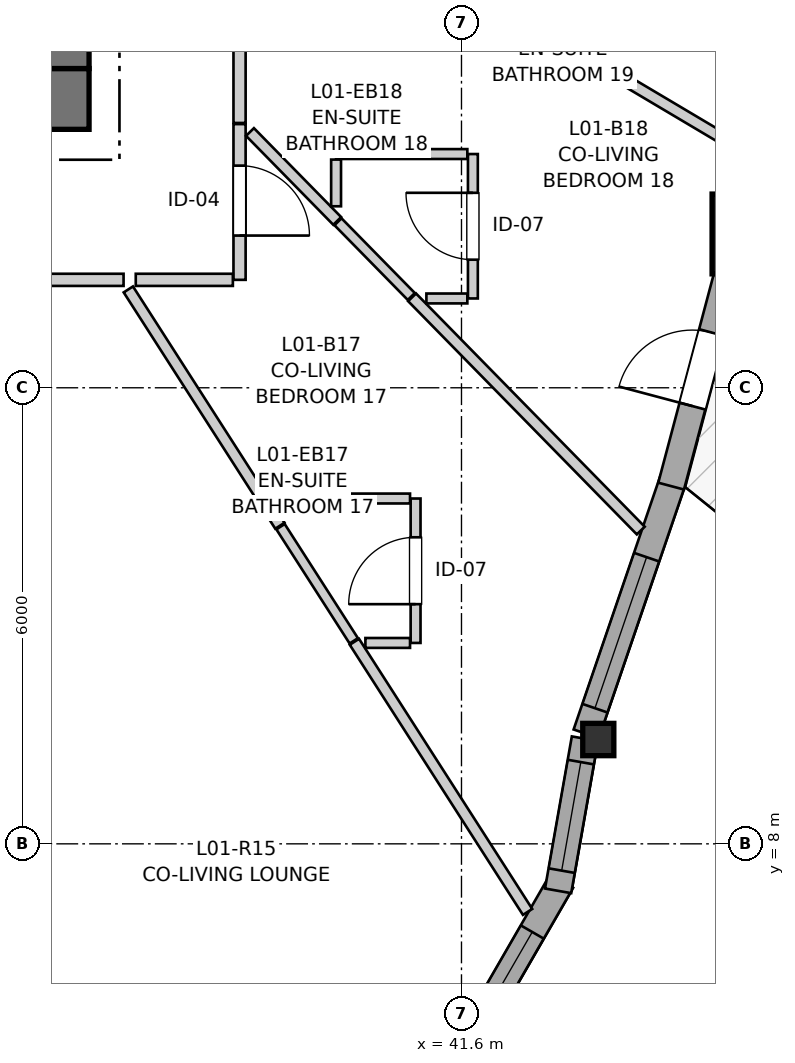
"""IFC4 building model, lengths in metres.
Left out: names, types, materials, properties, quantities, classifications, styles, units other than length and angle.
Written with IfcOpenShell. Run it as: python <this file> out.ifc"""

import sys

from ifc_helpers import new_model, si_unit, direction, frame, frame_2d, origin, origin_2d, place, context, subcontext, project, spatial, rectangle, i_section, extrude, source, transform, mapped, element, fill, save


model = new_model("IFC4")
c1 = context("Model", 3, precision=1e-05, world=origin(), true_north=direction((0.0, 1.0)))
c2 = subcontext(c1, "Body", "Model", "MODEL_VIEW")
j1 = project(units=[si_unit("LENGTHUNIT", "METRE"), si_unit("PLANEANGLEUNIT", "RADIAN")], contexts=[c1])
p1 = place(None, origin())
s1 = spatial("IfcSite", under=j1, at=p1, CompositionType="ELEMENT")
p2 = place(p1, origin())
s2 = spatial("IfcBuilding", under=s1, at=p2, CompositionType="ELEMENT")
p3 = place(p2, frame((0.0, 0.0, 7.8)))
s3 = spatial("IfcBuildingStorey", under=s2, at=p3, CompositionType="ELEMENT", Elevation=7.8)
p4 = place(p3, frame((24.0, 17.8, 0.0), z_axis=(0.0, 0.0, 1.0), x_axis=(1.0, 0.0, 0.0)))
e1 = element("IfcWall", 1, at=p4, inside=s3, PredefinedType="SHEAR", context=c2, shape_type="SweptSolid", body=[
    extrude(rectangle(XDim=12.7, YDim=0.8, at=frame_2d((6.35, 0.0))), origin(), (0.0, 0.0, 1.0), 2.94),
])
p5 = place(p3, frame((36.3, 18.2, 0.0), z_axis=(0.0, 0.0, 1.0), x_axis=(0.0, 1.0, 0.0)))
e2 = element("IfcWall", 2, at=p5, inside=s3, PredefinedType="SHEAR", context=c2, shape_type="SweptSolid", body=[
    extrude(rectangle(XDim=15.6, YDim=0.8, at=frame_2d((7.8, 0.0))), origin(), (0.0, 0.0, 1.0), 2.94),
])
p6 = place(p5, frame((4.25, 0.0, 0.0)))
e3 = element("IfcOpeningElement", 3, at=p6, cuts=e2, PredefinedType="OPENING", context=c2, shape_type="SweptSolid", body=[
    extrude(rectangle(XDim=1.1, YDim=2.15, at=frame_2d((0.55, 1.075))), frame((0.0, 0.41, 0.0), z_axis=(0.0, -1.0, 0.0), x_axis=(1.0, 0.0, 0.0)), (0.0, 0.0, 1.0), 0.82),
])
p7 = place(p5, frame((10.25, 0.0, 0.0)))
e4 = element("IfcOpeningElement", 4, at=p7, cuts=e2, PredefinedType="OPENING", context=c2, shape_type="SweptSolid", body=[
    extrude(rectangle(XDim=1.1, YDim=2.15, at=frame_2d((0.55, 1.075))), frame((0.0, 0.41, 0.0), z_axis=(0.0, -1.0, 0.0), x_axis=(1.0, 0.0, 0.0)), (0.0, 0.0, 1.0), 0.82),
])
m1 = source(origin(), c2, "Body", "SweptSolid", [
    extrude(i_section(OverallWidth=0.409, OverallDepth=0.425, WebThickness=0.03, FlangeThickness=0.048, FilletRadius=0.015, at=origin_2d()), origin(), (0.0, 0.0, 1.0), 2.94),
])
p8 = place(p3, frame((43.4, 9.372, 0.0), z_axis=(0.0, 0.0, 1.0), x_axis=(1.0, 0.0, 0.0)))
e5 = element("IfcColumn", 5, at=p8, inside=s3, PredefinedType="PILASTER", context=c2, shape_type="MappedRepresentation", body=[
    mapped(m1, transform((0.0, 0.0, 0.0), x_axis=(1.0, 0.0, 0.0), y_axis=(0.0, 1.0, 0.0), z_axis=(0.0, 0.0, 1.0), scale=1.0)),
])
m2 = source(origin(), c2, "Body", "SweptSolid", [
    extrude(rectangle(XDim=1.05, YDim=1.05, at=origin_2d()), origin(), (0.0, 0.0, 1.0), 2.94),
])
p9 = place(p3, frame((45.422, 16.023, 0.0), z_axis=(0.0, 0.0, 1.0), x_axis=(1.0, 0.0, 0.0)))
e6 = element("IfcColumn", 6, at=p9, inside=s3, PredefinedType="COLUMN", context=c2, shape_type="MappedRepresentation", body=[
    mapped(m2, transform((0.0, 0.0, 0.0), x_axis=(1.0, 0.0, 0.0), y_axis=(0.0, 1.0, 0.0), z_axis=(0.0, 0.0, 1.0), scale=1.0)),
])
p10 = place(p3, frame((41.873, 5.699, 0.0), z_axis=(0.0, 0.0, 1.0), x_axis=(0.49990781971, 0.866078617559, 0.0)))
e7 = element("IfcWall", 7, at=p10, inside=s3, PredefinedType="SOLIDWALL", context=c2, shape_type="SweptSolid", body=[
    extrude(rectangle(XDim=2.09, YDim=0.35, at=frame_2d((1.045, 0.0))), origin(), (0.0, 0.0, 1.0), 2.42),
])
p11 = place(p10, frame((0.268, 0.0, 0.82)))
e8 = element("IfcOpeningElement", 8, at=p11, cuts=e7, PredefinedType="OPENING", context=c2, shape_type="SweptSolid", body=[
    extrude(rectangle(XDim=1.05, YDim=1.45, at=frame_2d((0.525, 0.725))), frame((0.0, 0.185, 0.0), z_axis=(0.0, -1.0, 0.0), x_axis=(1.0, 0.0, 0.0)), (0.0, 0.0, 1.0), 0.37),
])
p12 = place(p3, frame((42.871, 7.382, 0.0), z_axis=(0.0, 0.0, 1.0), x_axis=(0.173586593252, 0.984818610021, 0.0)))
e9 = element("IfcWall", 9, at=p12, inside=s3, PredefinedType="SOLIDWALL", context=c2, shape_type="SweptSolid", body=[
    extrude(rectangle(XDim=2.032, YDim=0.35, at=frame_2d((1.016, 0.0))), origin(), (0.0, 0.0, 1.0), 2.42),
])
p13 = place(p12, frame((0.27, 0.0, 0.82)))
e10 = element("IfcOpeningElement", 10, at=p13, cuts=e9, PredefinedType="OPENING", context=c2, shape_type="SweptSolid", body=[
    extrude(rectangle(XDim=1.45, YDim=1.25, at=frame_2d((0.725, 0.625))), frame((0.0, 0.185, 0.0), z_axis=(0.0, -1.0, 0.0), x_axis=(1.0, 0.0, 0.0)), (0.0, 0.0, 1.0), 0.37),
])
p14 = place(p3, frame((43.241, 9.448, 0.0), z_axis=(0.0, 0.0, 1.0), x_axis=(0.323599751171, 0.946194060984, 0.0)))
e11 = element("IfcWall", 11, at=p14, inside=s3, PredefinedType="SOLIDWALL", context=c2, shape_type="SweptSolid", body=[
    extrude(rectangle(XDim=3.532, YDim=0.35, at=frame_2d((1.766, 0.0))), origin(), (0.0, 0.0, 1.0), 2.42),
])
p15 = place(p14, frame((0.356, 0.0, 0.82)))
e12 = element("IfcOpeningElement", 12, at=p15, cuts=e11, PredefinedType="OPENING", context=c2, shape_type="SweptSolid", body=[
    extrude(rectangle(XDim=2.1, YDim=1.4, at=frame_2d((1.05, 0.7))), frame((0.0, 0.185, 0.0), z_axis=(0.0, -1.0, 0.0), x_axis=(1.0, 0.0, 0.0)), (0.0, 0.0, 1.0), 0.37),
])
p16 = place(p3, frame((44.358, 12.706, 0.0), z_axis=(0.0, 0.0, 1.0), x_axis=(0.25708907847, 0.966387709841, 0.0)))
e13 = element("IfcWall", 13, at=p16, inside=s3, PredefinedType="SOLIDWALL", context=c2, shape_type="SweptSolid", body=[
    extrude(rectangle(XDim=3.179, YDim=0.35, at=frame_2d((1.59, 0.0))), origin(), (0.0, 0.0, 1.0), 2.42),
])
p17 = place(p16, frame((1.09, 0.0, 0.0)))
e14 = element("IfcOpeningElement", 14, at=p17, cuts=e13, PredefinedType="OPENING", context=c2, shape_type="SweptSolid", body=[
    extrude(rectangle(XDim=1.0, YDim=2.1, at=frame_2d((0.5, 1.05))), frame((0.0, 0.185, 0.0), z_axis=(0.0, -1.0, 0.0), x_axis=(1.0, 0.0, 0.0)), (0.0, 0.0, 1.0), 0.37),
])
p18 = place(p3, frame((37.154, 15.42, 0.0), z_axis=(0.0, 0.0, 1.0), x_axis=(-1.0, 0.0, 0.0)))
e15 = element("IfcWall", 15, at=p18, inside=s3, PredefinedType="PARTITIONING", context=c2, shape_type="SweptSolid", body=[
    extrude(rectangle(XDim=3.774, YDim=0.16, at=frame_2d((1.887, 0.0))), origin(), (0.0, 0.0, 1.0), 2.94),
])
p19 = place(p18, frame((1.239, 0.0, 0.0)))
e16 = element("IfcOpeningElement", 16, at=p19, cuts=e15, PredefinedType="OPENING", context=c2, shape_type="SweptSolid", body=[
    extrude(rectangle(XDim=1.3, YDim=2.1, at=frame_2d((0.65, 1.05))), frame((0.0, 0.09, 0.0), z_axis=(0.0, -1.0, 0.0), x_axis=(1.0, 0.0, 0.0)), (0.0, 0.0, 1.0), 0.18),
])
p20 = place(p3, frame((38.68, 21.073, 0.0), z_axis=(0.0, 0.0, 1.0), x_axis=(0.0, -1.0, 0.0)))
e17 = element("IfcWall", 17, at=p20, inside=s3, PredefinedType="PARTITIONING", context=c2, shape_type="SweptSolid", body=[
    extrude(rectangle(XDim=3.589, YDim=0.16, at=frame_2d((1.794, 0.0))), origin(), (0.0, 0.0, 1.0), 2.94),
])
p21 = place(p20, frame((1.333, 0.0, 0.0)))
e18 = element("IfcOpeningElement", 18, at=p21, cuts=e17, PredefinedType="OPENING", context=c2, shape_type="SweptSolid", body=[
    extrude(rectangle(XDim=0.92, YDim=2.1, at=frame_2d((0.46, 1.05))), frame((0.0, 0.09, 0.0), z_axis=(0.0, -1.0, 0.0), x_axis=(1.0, 0.0, 0.0)), (0.0, 0.0, 1.0), 0.18),
])
p22 = place(p3, frame((38.68, 17.469, 0.0), z_axis=(0.0, 0.0, 1.0), x_axis=(0.0, -1.0, 0.0)))
e19 = element("IfcWall", 19, at=p22, inside=s3, PredefinedType="PARTITIONING", context=c2, shape_type="SweptSolid", body=[
    extrude(rectangle(XDim=2.049, YDim=0.16, at=frame_2d((1.024, 0.0))), origin(), (0.0, 0.0, 1.0), 2.94),
])
p23 = place(p22, frame((0.546, 0.0, 0.0)))
e20 = element("IfcOpeningElement", 20, at=p23, cuts=e19, PredefinedType="OPENING", context=c2, shape_type="SweptSolid", body=[
    extrude(rectangle(XDim=0.92, YDim=2.1, at=frame_2d((0.46, 1.05))), frame((0.0, 0.09, 0.0), z_axis=(0.0, -1.0, 0.0), x_axis=(1.0, 0.0, 0.0)), (0.0, 0.0, 1.0), 0.18),
])
p24 = place(p3, frame((40.996, 10.643, 0.0), z_axis=(0.0, 0.0, 1.0), x_axis=(0.0, 1.0, 0.0)))
e21 = element("IfcWall", 21, at=p24, inside=s3, PredefinedType="PARTITIONING", context=c2, shape_type="SweptSolid", body=[
    extrude(rectangle(XDim=1.9, YDim=0.13, at=frame_2d((0.95, 0.0))), origin(), (0.0, 0.0, 1.0), 2.94),
])
p25 = place(p24, frame((0.51, 0.0, 0.0)))
e22 = element("IfcOpeningElement", 22, at=p25, cuts=e21, PredefinedType="OPENING", context=c2, shape_type="SweptSolid", body=[
    extrude(rectangle(XDim=0.88, YDim=2.05, at=frame_2d((0.44, 1.025))), frame((0.0, 0.075, 0.0), z_axis=(0.0, -1.0, 0.0), x_axis=(1.0, 0.0, 0.0)), (0.0, 0.0, 1.0), 0.15),
])
p26 = place(p3, frame((41.75, 15.175, 0.0), z_axis=(0.0, 0.0, 1.0), x_axis=(0.0, 1.0, 0.0)))
e23 = element("IfcWall", 23, at=p26, inside=s3, PredefinedType="PARTITIONING", context=c2, shape_type="SweptSolid", body=[
    extrude(rectangle(XDim=1.9, YDim=0.13, at=frame_2d((0.95, 0.0))), origin(), (0.0, 0.0, 1.0), 2.94),
])
p27 = place(p26, frame((0.51, 0.0, 0.0)))
e24 = element("IfcOpeningElement", 24, at=p27, cuts=e23, PredefinedType="OPENING", context=c2, shape_type="SweptSolid", body=[
    extrude(rectangle(XDim=0.88, YDim=2.05, at=frame_2d((0.44, 1.025))), frame((0.0, 0.075, 0.0), z_axis=(0.0, -1.0, 0.0), x_axis=(1.0, 0.0, 0.0)), (0.0, 0.0, 1.0), 0.15),
])
p28 = place(p3, frame((33.426, 15.312, 0.0), z_axis=(0.0, 0.0, 1.0), x_axis=(0.276606114731, -0.960983380342, 0.0)))
e25 = element("IfcWall", 25, at=p28, inside=s3, PredefinedType="PARTITIONING", context=c2, shape_type="SweptSolid", body=[
    extrude(rectangle(XDim=11.749, YDim=0.145, at=frame_2d((5.875, 0.0))), origin(), (0.0, 0.0, 1.0), 2.94),
])
p29 = place(p3, frame((40.95, 15.19, 0.0), z_axis=(0.0, 0.0, 1.0), x_axis=(0.700142401903, -0.714003233226, 0.0)))
e26 = element("IfcWall", 26, at=p29, inside=s3, PredefinedType="PARTITIONING", context=c2, shape_type="SweptSolid", body=[
    extrude(rectangle(XDim=4.298, YDim=0.145, at=frame_2d((2.149, 0.0))), origin(), (0.0, 0.0, 1.0), 2.94),
])
p30 = place(p3, frame((40.191, 10.658, 0.0), z_axis=(0.0, 0.0, 1.0), x_axis=(0.539757550566, -0.841820519236, 0.0)))
e27 = element("IfcWall", 27, at=p30, inside=s3, PredefinedType="PARTITIONING", context=c2, shape_type="SweptSolid", body=[
    extrude(rectangle(XDim=4.221, YDim=0.145, at=frame_2d((2.111, 0.0))), origin(), (0.0, 0.0, 1.0), 2.94),
])
p31 = place(p3, frame((37.217, 15.294, 0.0), z_axis=(0.0, 0.0, 1.0), x_axis=(0.539878709929, -0.841742822105, 0.0)))
e28 = element("IfcWall", 28, at=p31, inside=s3, PredefinedType="PARTITIONING", context=c2, shape_type="SweptSolid", body=[
    extrude(rectangle(XDim=3.694, YDim=0.145, at=frame_2d((1.847, 0.0))), origin(), (0.0, 0.0, 1.0), 2.94),
])
p32 = place(p3, frame((42.848, 18.581, 0.0), z_axis=(0.0, 0.0, 1.0), x_axis=(0.859872599939, -0.510508679528, 0.0)))
e29 = element("IfcWall", 29, at=p32, inside=s3, PredefinedType="PARTITIONING", context=c2, shape_type="SweptSolid", body=[
    extrude(rectangle(XDim=2.813, YDim=0.145, at=frame_2d((1.407, 0.0))), origin(), (0.0, 0.0, 1.0), 2.94),
])
p33 = place(p3, frame((38.817, 17.365, 0.0), z_axis=(0.0, 0.0, 1.0), x_axis=(0.70029627305, -0.713852316626, 0.0)))
e30 = element("IfcWall", 30, at=p33, inside=s3, PredefinedType="PARTITIONING", context=c2, shape_type="SweptSolid", body=[
    extrude(rectangle(XDim=1.639, YDim=0.145, at=frame_2d((0.819, 0.0))), origin(), (0.0, 0.0, 1.0), 2.94),
])
for number, where, z_axis, x_axis in (
    (31, (39.196, 12.543, 0.0), (0.0, 0.0, 1.0), (1.0, 0.0, 0.0)),
    (32, (39.95, 17.075, 0.0), (0.0, 0.0, 1.0), (1.0, 0.0, 0.0)),
):
    element("IfcWall", number, at=place(p3, frame(where, z_axis=z_axis, x_axis=x_axis)), inside=s3, PredefinedType="PARTITIONING", context=c2, shape_type="SweptSolid", body=[
        extrude(rectangle(XDim=1.727, YDim=0.13, at=frame_2d((0.864, 0.0))), origin(), (0.0, 0.0, 1.0), 2.94),
    ])
p34 = place(p3, frame((39.219, 12.172, 0.0), z_axis=(0.0, 0.0, 1.0), x_axis=(0.539899826285, -0.84172927808, 0.0)))
e33 = element("IfcWall", 33, at=p34, inside=s3, PredefinedType="PARTITIONING", context=c2, shape_type="SweptSolid", body=[
    extrude(rectangle(XDim=1.784, YDim=0.13, at=frame_2d((0.892, 0.0))), origin(), (0.0, 0.0, 1.0), 2.94),
])
p35 = place(p3, frame((37.314, 15.42, 0.0), z_axis=(0.0, 0.0, 1.0), x_axis=(1.0, 0.0, 0.0)))
e34 = element("IfcWall", 34, at=p35, inside=s3, PredefinedType="PARTITIONING", context=c2, shape_type="SweptSolid", body=[
    extrude(rectangle(XDim=1.278, YDim=0.16, at=frame_2d((0.639, 0.0))), origin(), (0.0, 0.0, 1.0), 2.94),
])
p36 = place(p3, frame((39.975, 16.184, 0.0), z_axis=(0.0, 0.0, 1.0), x_axis=(0.700338966049, -0.713810431861, 0.0)))
e35 = element("IfcWall", 35, at=p36, inside=s3, PredefinedType="PARTITIONING", context=c2, shape_type="SweptSolid", body=[
    extrude(rectangle(XDim=1.377, YDim=0.13, at=frame_2d((0.689, 0.0))), origin(), (0.0, 0.0, 1.0), 2.94),
])
p37 = place(p3, frame((39.95, 16.388, 0.0), z_axis=(0.0, 0.0, 1.0), x_axis=(0.0, 1.0, 0.0)))
e36 = element("IfcWall", 36, at=p37, inside=s3, PredefinedType="PARTITIONING", context=c2, shape_type="SweptSolid", body=[
    extrude(rectangle(XDim=0.614, YDim=0.13, at=frame_2d((0.307, 0.0))), origin(), (0.0, 0.0, 1.0), 2.94),
])
p38 = place(p3, frame((40.336, 10.643, 0.0), z_axis=(0.0, 0.0, 1.0), x_axis=(1.0, 0.0, 0.0)))
e37 = element("IfcWall", 37, at=p38, inside=s3, PredefinedType="PARTITIONING", context=c2, shape_type="SweptSolid", body=[
    extrude(rectangle(XDim=0.587, YDim=0.13, at=frame_2d((0.294, 0.0))), origin(), (0.0, 0.0, 1.0), 2.94),
])
p39 = place(p3, frame((41.138, 15.175, 0.0), z_axis=(0.0, 0.0, 1.0), x_axis=(1.0, 0.0, 0.0)))
e38 = element("IfcWall", 38, at=p39, inside=s3, PredefinedType="PARTITIONING", context=c2, shape_type="SweptSolid", body=[
    extrude(rectangle(XDim=0.539, YDim=0.13, at=frame_2d((0.27, 0.0))), origin(), (0.0, 0.0, 1.0), 2.94),
])
m3 = source(origin(), c2, "Body", "SweptSolid", [
    extrude(rectangle(XDim=1.05, YDim=1.45, at=frame_2d((0.525, 0.725))), frame((0.0, 0.03, 0.0), z_axis=(0.0, -1.0, 0.0), x_axis=(1.0, 0.0, 0.0)), (0.0, 0.0, 1.0), 0.06),
])
p40 = place(p11, origin())
e39 = element("IfcWindow", 39, at=p40, inside=s3, PartitioningType="SINGLE_PANEL", PredefinedType="WINDOW", context=c2, shape_type="MappedRepresentation", body=[
    mapped(m3, transform((0.0, 0.0, 0.0), x_axis=(1.0, 0.0, 0.0), y_axis=(0.0, 1.0, 0.0), z_axis=(0.0, 0.0, 1.0), scale=1.0)),
])
fill(e8, e39)
m4 = source(origin(), c2, "Body", "SweptSolid", [
    extrude(rectangle(XDim=1.45, YDim=1.25, at=frame_2d((0.725, 0.625))), frame((0.0, 0.03, 0.0), z_axis=(0.0, -1.0, 0.0), x_axis=(1.0, 0.0, 0.0)), (0.0, 0.0, 1.0), 0.06),
])
p41 = place(p13, origin())
e40 = element("IfcWindow", 40, at=p41, inside=s3, PartitioningType="SINGLE_PANEL", PredefinedType="WINDOW", context=c2, shape_type="MappedRepresentation", body=[
    mapped(m4, transform((0.0, 0.0, 0.0), x_axis=(1.0, 0.0, 0.0), y_axis=(0.0, 1.0, 0.0), z_axis=(0.0, 0.0, 1.0), scale=1.0)),
])
fill(e10, e40)
m5 = source(origin(), c2, "Body", "SweptSolid", [
    extrude(rectangle(XDim=2.1, YDim=1.4, at=frame_2d((1.05, 0.7))), frame((0.0, 0.03, 0.0), z_axis=(0.0, -1.0, 0.0), x_axis=(1.0, 0.0, 0.0)), (0.0, 0.0, 1.0), 0.06),
])
p42 = place(p15, origin())
e41 = element("IfcWindow", 41, at=p42, inside=s3, PartitioningType="SINGLE_PANEL", PredefinedType="WINDOW", context=c2, shape_type="MappedRepresentation", body=[
    mapped(m5, transform((0.0, 0.0, 0.0), x_axis=(1.0, 0.0, 0.0), y_axis=(0.0, 1.0, 0.0), z_axis=(0.0, 0.0, 1.0), scale=1.0)),
])
fill(e12, e41)
m6 = source(origin(), c2, "Body", "SweptSolid", [
    extrude(rectangle(XDim=1.0, YDim=2.1, at=frame_2d((0.5, 1.05))), frame((0.0, 0.025, 0.0), z_axis=(0.0, -1.0, 0.0), x_axis=(1.0, 0.0, 0.0)), (0.0, 0.0, 1.0), 0.05),
])
p43 = place(p17, origin())
e42 = element("IfcDoor", 42, at=p43, inside=s3, OperationType="SINGLE_SWING_LEFT", PredefinedType="DOOR", context=c2, shape_type="MappedRepresentation", body=[
    mapped(m6, transform((0.0, 0.0, 0.0), x_axis=(1.0, 0.0, 0.0), y_axis=(0.0, 1.0, 0.0), z_axis=(0.0, 0.0, 1.0), scale=1.0)),
])
fill(e14, e42)
m7 = source(origin(), c2, "Body", "SweptSolid", [
    extrude(rectangle(XDim=0.92, YDim=2.1, at=frame_2d((0.46, 1.05))), frame((0.0, 0.025, 0.0), z_axis=(0.0, -1.0, 0.0), x_axis=(1.0, 0.0, 0.0)), (0.0, 0.0, 1.0), 0.05),
])
p44 = place(p23, origin())
e43 = element("IfcDoor", 43, at=p44, inside=s3, OperationType="SINGLE_SWING_RIGHT", PredefinedType="DOOR", context=c2, shape_type="MappedRepresentation", body=[
    mapped(m7, transform((0.0, 0.0, 0.0), x_axis=(1.0, 0.0, 0.0), y_axis=(0.0, 1.0, 0.0), z_axis=(0.0, 0.0, 1.0), scale=1.0)),
])
fill(e20, e43)
m8 = source(origin(), c2, "Body", "SweptSolid", [
    extrude(rectangle(XDim=0.88, YDim=2.05, at=frame_2d((0.44, 1.025))), frame((0.0, 0.025, 0.0), z_axis=(0.0, -1.0, 0.0), x_axis=(1.0, 0.0, 0.0)), (0.0, 0.0, 1.0), 0.05),
])
p45 = place(p25, origin())
e44 = element("IfcDoor", 44, at=p45, inside=s3, OperationType="SINGLE_SWING_LEFT", PredefinedType="DOOR", context=c2, shape_type="MappedRepresentation", body=[
    mapped(m8, transform((0.0, 0.0, 0.0), x_axis=(1.0, 0.0, 0.0), y_axis=(0.0, 1.0, 0.0), z_axis=(0.0, 0.0, 1.0), scale=1.0)),
])
fill(e22, e44)
p46 = place(p27, origin())
e45 = element("IfcDoor", 45, at=p46, inside=s3, OperationType="SINGLE_SWING_RIGHT", PredefinedType="DOOR", context=c2, shape_type="MappedRepresentation", body=[
    mapped(m8, transform((0.0, 0.0, 0.0), x_axis=(1.0, 0.0, 0.0), y_axis=(0.0, 1.0, 0.0), z_axis=(0.0, 0.0, 1.0), scale=1.0)),
])
fill(e24, e45)
save(model, sys.argv[1])
